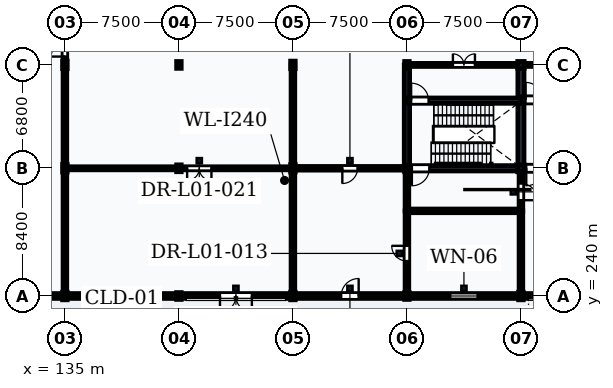
"""IFC4 building model, lengths in metres.
Left out: names, types, materials, properties, quantities, classifications, styles, units other than length and angle.
Written with IfcOpenShell. Run it as: python <this file> out.ifc"""

import sys

from ifc_helpers import new_model, si_unit, direction, frame, frame_2d, origin, origin_2d, place, context, subcontext, project, spatial, rectangle, i_section, extrude, element, fill, save


model = new_model("IFC4")
c1 = context("Model", 3, precision=1e-05, world=origin(), true_north=direction((0.0, 1.0)))
c2 = subcontext(c1, "Body", "Model", "MODEL_VIEW")
j1 = project(units=[si_unit("LENGTHUNIT", "METRE"), si_unit("PLANEANGLEUNIT", "RADIAN")], contexts=[c1])
p1 = place(None, origin())
s1 = spatial("IfcSite", under=j1, at=p1, CompositionType="ELEMENT")
p2 = place(p1, origin())
s2 = spatial("IfcBuilding", under=s1, at=p2, CompositionType="ELEMENT")
p3 = place(p2, origin())
s3 = spatial("IfcBuildingStorey", under=s2, at=p3, CompositionType="ELEMENT", Elevation=0.0)
for number, where, z_axis, x_axis in (
    (1, (135.0, 240.0, 0.0), (0.0, 0.0, 1.0), (1.0, 0.0, 0.0)),
    (2, (135.0, 248.4, 0.0), (0.0, 0.0, 1.0), (1.0, 0.0, 0.0)),
    (3, (135.0, 255.2, 0.0), (0.0, 0.0, 1.0), (1.0, 0.0, 0.0)),
):
    element("IfcColumn", number, at=place(p3, frame(where, z_axis=z_axis, x_axis=x_axis)), inside=s3, PredefinedType="COLUMN", context=c2, shape_type="SweptSolid", body=[
        extrude(i_section(OverallWidth=0.3, OverallDepth=0.5, WebThickness=0.014, FlangeThickness=0.028, FilletRadius=0.027, at=origin_2d()), origin(), (0.0, 0.0, 1.0), 5.4),
    ])
for number, where, z_axis, x_axis in (
    (4, (142.5, 240.0, 0.0), (0.0, 0.0, 1.0), (1.0, 0.0, 0.0)),
    (5, (142.5, 248.4, 0.0), (0.0, 0.0, 1.0), (1.0, 0.0, 0.0)),
    (6, (142.5, 255.2, 0.0), (0.0, 0.0, 1.0), (1.0, 0.0, 0.0)),
):
    element("IfcColumn", number, at=place(p3, frame(where, z_axis=z_axis, x_axis=x_axis)), inside=s3, PredefinedType="COLUMN", context=c2, shape_type="SweptSolid", body=[
        extrude(i_section(OverallWidth=0.3, OverallDepth=0.45, WebThickness=0.014, FlangeThickness=0.026, FilletRadius=0.027, at=origin_2d()), origin(), (0.0, 0.0, 1.0), 5.4),
    ])
for number, where, z_axis, x_axis in (
    (7, (150.0, 240.0, 0.0), (0.0, 0.0, 1.0), (1.0, 0.0, 0.0)),
    (8, (150.0, 248.4, 0.0), (0.0, 0.0, 1.0), (1.0, 0.0, 0.0)),
    (9, (150.0, 255.2, 0.0), (0.0, 0.0, 1.0), (1.0, 0.0, 0.0)),
):
    element("IfcColumn", number, at=place(p3, frame(where, z_axis=z_axis, x_axis=x_axis)), inside=s3, PredefinedType="COLUMN", context=c2, shape_type="SweptSolid", body=[
        extrude(i_section(OverallWidth=0.3, OverallDepth=0.5, WebThickness=0.014, FlangeThickness=0.028, FilletRadius=0.027, at=origin_2d()), origin(), (0.0, 0.0, 1.0), 5.4),
    ])
for number, where, z_axis, x_axis in (
    (10, (157.5, 240.0, 0.0), (0.0, 0.0, 1.0), (1.0, 0.0, 0.0)),
    (11, (157.5, 248.4, 0.0), (0.0, 0.0, 1.0), (1.0, 0.0, 0.0)),
    (12, (157.5, 255.2, 0.0), (0.0, 0.0, 1.0), (1.0, 0.0, 0.0)),
):
    element("IfcColumn", number, at=place(p3, frame(where, z_axis=z_axis, x_axis=x_axis)), inside=s3, PredefinedType="COLUMN", context=c2, shape_type="SweptSolid", body=[
        extrude(i_section(OverallWidth=0.3, OverallDepth=0.45, WebThickness=0.014, FlangeThickness=0.026, FilletRadius=0.027, at=origin_2d()), origin(), (0.0, 0.0, 1.0), 5.4),
    ])
p4 = place(p3, frame((165.0, 240.0, 0.0), z_axis=(0.0, 0.0, 1.0), x_axis=(1.0, 0.0, 0.0)))
e13 = element("IfcColumn", 13, at=p4, inside=s3, PredefinedType="COLUMN", context=c2, shape_type="SweptSolid", body=[
    extrude(i_section(OverallWidth=0.3, OverallDepth=0.5, WebThickness=0.014, FlangeThickness=0.028, FilletRadius=0.027, at=origin_2d()), origin(), (0.0, 0.0, 1.0), 5.4),
])
for number, where, z_axis, x_axis in (
    (14, (165.0, 248.4, 0.0), (0.0, 0.0, 1.0), (1.0, 0.0, 0.0)),
    (15, (165.0, 255.2, 0.0), (0.0, 0.0, 1.0), (1.0, 0.0, 0.0)),
):
    element("IfcColumn", number, at=place(p3, frame(where, z_axis=z_axis, x_axis=x_axis)), inside=s3, PredefinedType="COLUMN", context=c2, shape_type="SweptSolid", body=[
        extrude(i_section(OverallWidth=0.418, OverallDepth=0.455, WebThickness=0.042, FlangeThickness=0.068, FilletRadius=0.015, at=origin_2d()), origin(), (0.0, 0.0, 1.0), 5.4),
    ])
p5 = place(p3, frame((127.506, 240.0, 0.0), z_axis=(0.0, 0.0, 1.0), x_axis=(1.0, 0.0, 0.0)))
e16 = element("IfcWall", 16, at=p5, inside=s3, PredefinedType="SOLIDWALL", context=c2, shape_type="SweptSolid", body=[
    extrude(rectangle(XDim=7.488, YDim=0.32, at=frame_2d((3.744, 0.0))), origin(), (0.0, 0.0, 1.0), 4.878),
])
p6 = place(p5, frame((2.144, 0.0, 0.0)))
e17 = element("IfcOpeningElement", 17, at=p6, cuts=e16, PredefinedType="OPENING", context=c2, shape_type="SweptSolid", body=[
    extrude(rectangle(XDim=3.2, YDim=3.0, at=frame_2d((1.6, 1.5))), frame((0.0, 0.175, 0.0), z_axis=(0.0, -1.0, 0.0), x_axis=(1.0, 0.0, 0.0)), (0.0, 0.0, 1.0), 0.35),
])
p7 = place(p3, frame((135.006, 240.0, 0.0), z_axis=(0.0, 0.0, 1.0), x_axis=(1.0, 0.0, 0.0)))
e18 = element("IfcWall", 18, at=p7, inside=s3, PredefinedType="SOLIDWALL", context=c2, shape_type="SweptSolid", body=[
    extrude(rectangle(XDim=7.488, YDim=0.32, at=frame_2d((3.744, 0.0))), origin(), (0.0, 0.0, 1.0), 4.878),
])
p8 = place(p7, frame((2.544, 0.0, 0.95)))
e19 = element("IfcOpeningElement", 19, at=p8, cuts=e18, PredefinedType="OPENING", context=c2, shape_type="SweptSolid", body=[
    extrude(rectangle(XDim=2.4, YDim=2.8, at=frame_2d((1.2, 1.4))), frame((0.0, 0.175, 0.0), z_axis=(0.0, -1.0, 0.0), x_axis=(1.0, 0.0, 0.0)), (0.0, 0.0, 1.0), 0.35),
])
p9 = place(p3, frame((142.506, 240.0, 0.0), z_axis=(0.0, 0.0, 1.0), x_axis=(1.0, 0.0, 0.0)))
e20 = element("IfcWall", 20, at=p9, inside=s3, PredefinedType="SOLIDWALL", context=c2, shape_type="SweptSolid", body=[
    extrude(rectangle(XDim=7.488, YDim=0.32, at=frame_2d((3.744, 0.0))), origin(), (0.0, 0.0, 1.0), 4.878),
])
p10 = place(p9, frame((2.694, 0.0, 0.0)))
e21 = element("IfcOpeningElement", 21, at=p10, cuts=e20, PredefinedType="OPENING", context=c2, shape_type="SweptSolid", body=[
    extrude(rectangle(XDim=2.1, YDim=2.7, at=frame_2d((1.05, 1.35))), frame((0.0, 0.175, 0.0), z_axis=(0.0, -1.0, 0.0), x_axis=(1.0, 0.0, 0.0)), (0.0, 0.0, 1.0), 0.35),
])
p11 = place(p3, frame((150.006, 240.0, 0.0), z_axis=(0.0, 0.0, 1.0), x_axis=(1.0, 0.0, 0.0)))
e22 = element("IfcWall", 22, at=p11, inside=s3, PredefinedType="SOLIDWALL", context=c2, shape_type="SweptSolid", body=[
    extrude(rectangle(XDim=7.488, YDim=0.32, at=frame_2d((3.744, 0.0))), origin(), (0.0, 0.0, 1.0), 4.878),
])
p12 = place(p11, frame((3.169, 0.0, 0.0)))
e23 = element("IfcOpeningElement", 23, at=p12, cuts=e22, PredefinedType="OPENING", context=c2, shape_type="SweptSolid", body=[
    extrude(rectangle(XDim=1.15, YDim=2.25, at=frame_2d((0.575, 1.125))), frame((0.0, 0.175, 0.0), z_axis=(0.0, -1.0, 0.0), x_axis=(1.0, 0.0, 0.0)), (0.0, 0.0, 1.0), 0.35),
])
p13 = place(p3, frame((157.506, 240.0, 0.0), z_axis=(0.0, 0.0, 1.0), x_axis=(1.0, 0.0, 0.0)))
e24 = element("IfcWall", 24, at=p13, inside=s3, PredefinedType="SOLIDWALL", context=c2, shape_type="SweptSolid", body=[
    extrude(rectangle(XDim=7.488, YDim=0.32, at=frame_2d((3.744, 0.0))), origin(), (0.0, 0.0, 1.0), 4.878),
])
p14 = place(p13, frame((2.844, 0.0, 0.95)))
e25 = element("IfcOpeningElement", 25, at=p14, cuts=e24, PredefinedType="OPENING", context=c2, shape_type="SweptSolid", body=[
    extrude(rectangle(XDim=1.8, YDim=2.6, at=frame_2d((0.9, 1.3))), frame((0.0, 0.175, 0.0), z_axis=(0.0, -1.0, 0.0), x_axis=(1.0, 0.0, 0.0)), (0.0, 0.0, 1.0), 0.35),
])
p15 = place(p3, frame((165.006, 240.0, 0.0), z_axis=(0.0, 0.0, 1.0), x_axis=(1.0, 0.0, 0.0)))
e26 = element("IfcWall", 26, at=p15, inside=s3, PredefinedType="SOLIDWALL", context=c2, shape_type="SweptSolid", body=[
    extrude(rectangle(XDim=7.988, YDim=0.32, at=frame_2d((3.994, 0.0))), origin(), (0.0, 0.0, 1.0), 4.838),
])
p16 = place(p15, frame((2.944, 0.0, 0.0)))
e27 = element("IfcOpeningElement", 27, at=p16, cuts=e26, PredefinedType="OPENING", context=c2, shape_type="SweptSolid", body=[
    extrude(rectangle(XDim=2.1, YDim=2.7, at=frame_2d((1.05, 1.35))), frame((0.0, 0.175, 0.0), z_axis=(0.0, -1.0, 0.0), x_axis=(1.0, 0.0, 0.0)), (0.0, 0.0, 1.0), 0.35),
])
p17 = place(p3, frame((120.1, 240.1, 5.4), z_axis=(0.0, 0.0, 1.0), x_axis=(1.0, 0.0, 0.0)))
e28 = element("IfcWall", 28, at=p17, inside=s3, PredefinedType="PARAPET", context=c2, shape_type="SweptSolid", body=[
    extrude(rectangle(XDim=167.8, YDim=0.18, at=frame_2d((83.9, 0.0))), origin(), (0.0, 0.0, 1.0), 1.2),
])
p18 = place(p3, frame((165.0, 248.4, 0.0), z_axis=(0.0, 0.0, 1.0), x_axis=(1.0, 0.0, 0.0)))
e29 = element("IfcWall", 29, at=p18, inside=s3, PredefinedType="SHEAR", context=c2, shape_type="SweptSolid", body=[
    extrude(rectangle(XDim=8.0, YDim=0.4, at=frame_2d((4.0, 0.0))), origin(), (0.0, 0.0, 1.0), 5.14),
])
p19 = place(p18, frame((0.35, 0.0, 0.0)))
e30 = element("IfcOpeningElement", 30, at=p19, cuts=e29, PredefinedType="OPENING", context=c2, shape_type="SweptSolid", body=[
    extrude(rectangle(XDim=1.15, YDim=2.15, at=frame_2d((0.575, 1.075))), frame((0.0, 0.215, 0.0), z_axis=(0.0, -1.0, 0.0), x_axis=(1.0, 0.0, 0.0)), (0.0, 0.0, 1.0), 0.43),
])
p20 = place(p3, frame((165.0, 248.4, 0.0), z_axis=(0.0, 0.0, 1.0), x_axis=(0.0, 1.0, 0.0)))
e31 = element("IfcWall", 31, at=p20, inside=s3, PredefinedType="SHEAR", context=c2, shape_type="SweptSolid", body=[
    extrude(rectangle(XDim=6.8, YDim=0.4, at=frame_2d((3.4, 0.0))), origin(), (0.0, 0.0, 1.0), 5.14),
])
p21 = place(p3, frame((165.0, 252.9, 0.0), z_axis=(0.0, 0.0, 1.0), x_axis=(1.0, 0.0, 0.0)))
e32 = element("IfcWall", 32, at=p21, inside=s3, PredefinedType="SHEAR", context=c2, shape_type="SweptSolid", body=[
    extrude(rectangle(XDim=8.0, YDim=0.4, at=frame_2d((4.0, 0.0))), origin(), (0.0, 0.0, 1.0), 5.14),
])
p22 = place(p21, frame((0.3, 0.0, 0.0)))
e33 = element("IfcOpeningElement", 33, at=p22, cuts=e32, PredefinedType="OPENING", context=c2, shape_type="SweptSolid", body=[
    extrude(rectangle(XDim=1.15, YDim=2.15, at=frame_2d((0.575, 1.075))), frame((0.0, 0.215, 0.0), z_axis=(0.0, -1.0, 0.0), x_axis=(1.0, 0.0, 0.0)), (0.0, 0.0, 1.0), 0.43),
])
p23 = place(p3, frame((165.0, 255.2, 0.0), z_axis=(0.0, 0.0, 1.0), x_axis=(1.0, 0.0, 0.0)))
e34 = element("IfcWall", 34, at=p23, inside=s3, PredefinedType="PARTITIONING", context=c2, shape_type="SweptSolid", body=[
    extrude(rectangle(XDim=8.0, YDim=0.2, at=frame_2d((4.0, 0.0))), origin(), (0.0, 0.0, 1.0), 4.638),
])
p24 = place(p23, frame((3.275, 0.0, 0.0)))
e35 = element("IfcOpeningElement", 35, at=p24, cuts=e34, PredefinedType="OPENING", context=c2, shape_type="SweptSolid", body=[
    extrude(rectangle(XDim=1.45, YDim=2.2, at=frame_2d((0.725, 1.1))), frame((0.0, 0.115, 0.0), z_axis=(0.0, -1.0, 0.0), x_axis=(1.0, 0.0, 0.0)), (0.0, 0.0, 1.0), 0.23),
])
p25 = place(p3, frame((157.5, 248.4, 0.0), z_axis=(0.0, 0.0, 1.0), x_axis=(1.0, 0.0, 0.0)))
e36 = element("IfcWall", 36, at=p25, inside=s3, PredefinedType="SHEAR", context=c2, shape_type="SweptSolid", body=[
    extrude(rectangle(XDim=7.5, YDim=0.35, at=frame_2d((3.75, 0.0))), origin(), (0.0, 0.0, 1.0), 5.14),
])
p26 = place(p25, frame((0.325, 0.0, 0.0)))
e37 = element("IfcOpeningElement", 37, at=p26, cuts=e36, PredefinedType="OPENING", context=c2, shape_type="SweptSolid", body=[
    extrude(rectangle(XDim=1.15, YDim=2.15, at=frame_2d((0.575, 1.075))), frame((0.0, 0.19, 0.0), z_axis=(0.0, -1.0, 0.0), x_axis=(1.0, 0.0, 0.0)), (0.0, 0.0, 1.0), 0.38),
])
p27 = place(p3, frame((157.5, 248.4, 0.0), z_axis=(0.0, 0.0, 1.0), x_axis=(0.0, 1.0, 0.0)))
e38 = element("IfcWall", 38, at=p27, inside=s3, PredefinedType="SHEAR", context=c2, shape_type="SweptSolid", body=[
    extrude(rectangle(XDim=6.8, YDim=0.35, at=frame_2d((3.4, 0.0))), origin(), (0.0, 0.0, 1.0), 5.14),
])
p28 = place(p3, frame((157.5, 252.85, 0.0), z_axis=(0.0, 0.0, 1.0), x_axis=(1.0, 0.0, 0.0)))
e39 = element("IfcWall", 39, at=p28, inside=s3, PredefinedType="SHEAR", context=c2, shape_type="SweptSolid", body=[
    extrude(rectangle(XDim=7.5, YDim=0.35, at=frame_2d((3.75, 0.0))), origin(), (0.0, 0.0, 1.0), 5.14),
])
p29 = place(p28, frame((0.275, 0.0, 0.0)))
e40 = element("IfcOpeningElement", 40, at=p29, cuts=e39, PredefinedType="OPENING", context=c2, shape_type="SweptSolid", body=[
    extrude(rectangle(XDim=1.15, YDim=2.15, at=frame_2d((0.575, 1.075))), frame((0.0, 0.19, 0.0), z_axis=(0.0, -1.0, 0.0), x_axis=(1.0, 0.0, 0.0)), (0.0, 0.0, 1.0), 0.38),
])
p30 = place(p3, frame((157.5, 255.2, 0.0), z_axis=(0.0, 0.0, 1.0), x_axis=(1.0, 0.0, 0.0)))
e41 = element("IfcWall", 41, at=p30, inside=s3, PredefinedType="PARTITIONING", context=c2, shape_type="SweptSolid", body=[
    extrude(rectangle(XDim=7.5, YDim=0.2, at=frame_2d((3.75, 0.0))), origin(), (0.0, 0.0, 1.0), 4.778),
])
p31 = place(p30, frame((3.025, 0.0, 0.0)))
e42 = element("IfcOpeningElement", 42, at=p31, cuts=e41, PredefinedType="OPENING", context=c2, shape_type="SweptSolid", body=[
    extrude(rectangle(XDim=1.45, YDim=2.2, at=frame_2d((0.725, 1.1))), frame((0.0, 0.115, 0.0), z_axis=(0.0, -1.0, 0.0), x_axis=(1.0, 0.0, 0.0)), (0.0, 0.0, 1.0), 0.23),
])
p32 = place(p3, frame((150.0, 240.0, 0.0), z_axis=(0.0, 0.0, 1.0), x_axis=(0.0, 1.0, 0.0)))
e43 = element("IfcWall", 43, at=p32, inside=s3, PredefinedType="PARTITIONING", context=c2, shape_type="SweptSolid", body=[
    extrude(rectangle(XDim=15.2, YDim=0.24, at=frame_2d((7.6, 0.0))), origin(), (0.0, 0.0, 1.0), 4.688),
])
p33 = place(p3, frame((157.5, 240.0, 0.0), z_axis=(0.0, 0.0, 1.0), x_axis=(0.0, 1.0, 0.0)))
e44 = element("IfcWall", 44, at=p33, inside=s3, PredefinedType="PARTITIONING", context=c2, shape_type="SweptSolid", body=[
    extrude(rectangle(XDim=5.6, YDim=0.24, at=frame_2d((2.8, 0.0))), origin(), (0.0, 0.0, 1.0), 4.688),
])
p34 = place(p33, frame((2.3, 0.0, 0.0)))
e45 = element("IfcOpeningElement", 45, at=p34, cuts=e44, PredefinedType="OPENING", context=c2, shape_type="SweptSolid", body=[
    extrude(rectangle(XDim=1.0, YDim=2.1, at=frame_2d((0.5, 1.05))), frame((0.0, 0.135, 0.0), z_axis=(0.0, -1.0, 0.0), x_axis=(1.0, 0.0, 0.0)), (0.0, 0.0, 1.0), 0.27),
])
p35 = place(p3, frame((157.5, 245.6, 0.0), z_axis=(0.0, 0.0, 1.0), x_axis=(0.0, 1.0, 0.0)))
e46 = element("IfcWall", 46, at=p35, inside=s3, PredefinedType="PARTITIONING", context=c2, shape_type="SweptSolid", body=[
    extrude(rectangle(XDim=2.8, YDim=0.24, at=frame_2d((1.4, 0.0))), origin(), (0.0, 0.0, 1.0), 4.688),
])
p36 = place(p3, frame((150.0, 248.4, 0.0), z_axis=(0.0, 0.0, 1.0), x_axis=(1.0, 0.0, 0.0)))
e47 = element("IfcWall", 47, at=p36, inside=s3, PredefinedType="PARTITIONING", context=c2, shape_type="SweptSolid", body=[
    extrude(rectangle(XDim=7.5, YDim=0.24, at=frame_2d((3.75, 0.0))), origin(), (0.0, 0.0, 1.0), 4.778),
])
p37 = place(p36, frame((3.25, 0.0, 0.0)))
e48 = element("IfcOpeningElement", 48, at=p37, cuts=e47, PredefinedType="OPENING", context=c2, shape_type="SweptSolid", body=[
    extrude(rectangle(XDim=1.0, YDim=2.1, at=frame_2d((0.5, 1.05))), frame((0.0, 0.135, 0.0), z_axis=(0.0, -1.0, 0.0), x_axis=(1.0, 0.0, 0.0)), (0.0, 0.0, 1.0), 0.27),
])
p38 = place(p3, frame((135.0, 240.0, 0.0), z_axis=(0.0, 0.0, 1.0), x_axis=(0.0, 1.0, 0.0)))
e49 = element("IfcWall", 49, at=p38, inside=s3, PredefinedType="PARTITIONING", context=c2, shape_type="SweptSolid", body=[
    extrude(rectangle(XDim=18.2, YDim=0.24, at=frame_2d((9.1, 0.0))), origin(), (0.0, 0.0, 1.0), 4.688),
])
p39 = place(p38, frame((15.75, 0.0, 0.0)))
e50 = element("IfcOpeningElement", 50, at=p39, cuts=e49, PredefinedType="OPENING", context=c2, shape_type="SweptSolid", body=[
    extrude(rectangle(XDim=1.8, YDim=2.25, at=frame_2d((0.9, 1.125))), frame((0.0, 0.135, 0.0), z_axis=(0.0, -1.0, 0.0), x_axis=(1.0, 0.0, 0.0)), (0.0, 0.0, 1.0), 0.27),
])
p40 = place(p3, frame((157.5, 245.6, 0.0), z_axis=(0.0, 0.0, 1.0), x_axis=(1.0, 0.0, 0.0)))
e51 = element("IfcWall", 51, at=p40, inside=s3, PredefinedType="PARTITIONING", context=c2, shape_type="SweptSolid", body=[
    extrude(rectangle(XDim=7.5, YDim=0.24, at=frame_2d((3.75, 0.0))), origin(), (0.0, 0.0, 1.0), 5.15),
])
p41 = place(p3, frame((165.0, 240.0, 0.0), z_axis=(0.0, 0.0, 1.0), x_axis=(0.0, 1.0, 0.0)))
e52 = element("IfcWall", 52, at=p41, inside=s3, PredefinedType="PARTITIONING", context=c2, shape_type="SweptSolid", body=[
    extrude(rectangle(XDim=5.6, YDim=0.24, at=frame_2d((2.8, 0.0))), origin(), (0.0, 0.0, 1.0), 4.688),
])
p42 = place(p3, frame((165.0, 245.6, 0.0), z_axis=(0.0, 0.0, 1.0), x_axis=(0.0, 1.0, 0.0)))
e53 = element("IfcWall", 53, at=p42, inside=s3, PredefinedType="PARTITIONING", context=c2, shape_type="SweptSolid", body=[
    extrude(rectangle(XDim=2.8, YDim=0.24, at=frame_2d((1.4, 0.0))), origin(), (0.0, 0.0, 1.0), 4.688),
])
p43 = place(p42, frame((0.7, 0.0, 0.0)))
e54 = element("IfcOpeningElement", 54, at=p43, cuts=e53, PredefinedType="OPENING", context=c2, shape_type="SweptSolid", body=[
    extrude(rectangle(XDim=1.1, YDim=2.1, at=frame_2d((0.55, 1.05))), frame((0.0, 0.135, 0.0), z_axis=(0.0, -1.0, 0.0), x_axis=(1.0, 0.0, 0.0)), (0.0, 0.0, 1.0), 0.27),
])
p44 = place(p3, frame((135.0, 248.4, 0.0), z_axis=(0.0, 0.0, 1.0), x_axis=(1.0, 0.0, 0.0)))
e55 = element("IfcWall", 55, at=p44, inside=s3, PredefinedType="PARTITIONING", context=c2, shape_type="SweptSolid", body=[
    extrude(rectangle(XDim=15.0, YDim=0.2, at=frame_2d((7.5, 0.0))), origin(), (0.0, 0.0, 1.0), 4.778),
])
p45 = place(p44, frame((8.04, 0.0, 0.0)))
e56 = element("IfcOpeningElement", 56, at=p45, cuts=e55, PredefinedType="OPENING", context=c2, shape_type="SweptSolid", body=[
    extrude(rectangle(XDim=1.6, YDim=2.25, at=frame_2d((0.8, 1.125))), frame((0.0, 0.115, 0.0), z_axis=(0.0, -1.0, 0.0), x_axis=(1.0, 0.0, 0.0)), (0.0, 0.0, 1.0), 0.23),
])
p46 = place(p8, origin())
e57 = element("IfcWindow", 57, at=p46, inside=s3, PartitioningType="DOUBLE_PANEL_VERTICAL", PredefinedType="WINDOW", context=c2, shape_type="SweptSolid", body=[
    extrude(rectangle(XDim=2.4, YDim=2.8, at=frame_2d((1.2, 1.4))), frame((0.0, 0.03, 0.0), z_axis=(0.0, -1.0, 0.0), x_axis=(1.0, 0.0, 0.0)), (0.0, 0.0, 1.0), 0.06),
])
fill(e19, e57)
p47 = place(p10, frame((2.1, 0.0, 0.0), z_axis=(0.0, 0.0, 1.0), x_axis=(-1.0, 0.0, 0.0)))
e58 = element("IfcDoor", 58, at=p47, inside=s3, OperationType="DOUBLE_DOOR_SINGLE_SWING", PredefinedType="DOOR", context=c2, shape_type="SweptSolid", body=[
    extrude(rectangle(XDim=2.1, YDim=2.7, at=frame_2d((1.05, 1.35))), frame((0.0, 0.025, 0.0), z_axis=(0.0, -1.0, 0.0), x_axis=(1.0, 0.0, 0.0)), (0.0, 0.0, 1.0), 0.05),
])
fill(e21, e58)
p48 = place(p12, frame((1.15, 0.0, 0.0), z_axis=(0.0, 0.0, 1.0), x_axis=(-1.0, 0.0, 0.0)))
e59 = element("IfcDoor", 59, at=p48, inside=s3, OperationType="SINGLE_SWING_LEFT", PredefinedType="DOOR", context=c2, shape_type="SweptSolid", body=[
    extrude(rectangle(XDim=1.15, YDim=2.25, at=frame_2d((0.575, 1.125))), frame((0.0, 0.025, 0.0), z_axis=(0.0, -1.0, 0.0), x_axis=(1.0, 0.0, 0.0)), (0.0, 0.0, 1.0), 0.05),
])
fill(e23, e59)
p49 = place(p14, origin())
e60 = element("IfcWindow", 60, at=p49, inside=s3, PartitioningType="DOUBLE_PANEL_VERTICAL", PredefinedType="WINDOW", context=c2, shape_type="SweptSolid", body=[
    extrude(rectangle(XDim=1.8, YDim=2.6, at=frame_2d((0.9, 1.3))), frame((0.0, 0.03, 0.0), z_axis=(0.0, -1.0, 0.0), x_axis=(1.0, 0.0, 0.0)), (0.0, 0.0, 1.0), 0.06),
])
fill(e25, e60)
p50 = place(p22, origin())
e61 = element("IfcDoor", 61, at=p50, inside=s3, OperationType="SINGLE_SWING_LEFT", PredefinedType="DOOR", context=c2, shape_type="SweptSolid", body=[
    extrude(rectangle(XDim=1.15, YDim=2.15, at=frame_2d((0.575, 1.075))), frame((0.0, 0.025, 0.0), z_axis=(0.0, -1.0, 0.0), x_axis=(1.0, 0.0, 0.0)), (0.0, 0.0, 1.0), 0.05),
])
fill(e33, e61)
p51 = place(p19, frame((1.15, 0.0, 0.0), z_axis=(0.0, 0.0, 1.0), x_axis=(-1.0, 0.0, 0.0)))
e62 = element("IfcDoor", 62, at=p51, inside=s3, OperationType="SINGLE_SWING_RIGHT", PredefinedType="DOOR", context=c2, shape_type="SweptSolid", body=[
    extrude(rectangle(XDim=1.15, YDim=2.15, at=frame_2d((0.575, 1.075))), frame((0.0, 0.025, 0.0), z_axis=(0.0, -1.0, 0.0), x_axis=(1.0, 0.0, 0.0)), (0.0, 0.0, 1.0), 0.05),
])
fill(e30, e62)
p52 = place(p29, origin())
e63 = element("IfcDoor", 63, at=p52, inside=s3, OperationType="SINGLE_SWING_LEFT", PredefinedType="DOOR", context=c2, shape_type="SweptSolid", body=[
    extrude(rectangle(XDim=1.15, YDim=2.15, at=frame_2d((0.575, 1.075))), frame((0.0, 0.025, 0.0), z_axis=(0.0, -1.0, 0.0), x_axis=(1.0, 0.0, 0.0)), (0.0, 0.0, 1.0), 0.05),
])
fill(e40, e63)
p53 = place(p26, frame((1.15, 0.0, 0.0), z_axis=(0.0, 0.0, 1.0), x_axis=(-1.0, 0.0, 0.0)))
e64 = element("IfcDoor", 64, at=p53, inside=s3, OperationType="SINGLE_SWING_RIGHT", PredefinedType="DOOR", context=c2, shape_type="SweptSolid", body=[
    extrude(rectangle(XDim=1.15, YDim=2.15, at=frame_2d((0.575, 1.075))), frame((0.0, 0.025, 0.0), z_axis=(0.0, -1.0, 0.0), x_axis=(1.0, 0.0, 0.0)), (0.0, 0.0, 1.0), 0.05),
])
fill(e37, e64)
p54 = place(p31, origin())
e65 = element("IfcDoor", 65, at=p54, inside=s3, OperationType="DOUBLE_DOOR_SINGLE_SWING", PredefinedType="DOOR", context=c2, shape_type="SweptSolid", body=[
    extrude(rectangle(XDim=1.45, YDim=2.2, at=frame_2d((0.725, 1.1))), frame((0.0, 0.025, 0.0), z_axis=(0.0, -1.0, 0.0), x_axis=(1.0, 0.0, 0.0)), (0.0, 0.0, 1.0), 0.05),
])
fill(e42, e65)
p55 = place(p34, frame((1.0, 0.0, 0.0), z_axis=(0.0, 0.0, 1.0), x_axis=(-1.0, 0.0, 0.0)))
e66 = element("IfcDoor", 66, at=p55, inside=s3, OperationType="SINGLE_SWING_LEFT", PredefinedType="DOOR", context=c2, shape_type="SweptSolid", body=[
    extrude(rectangle(XDim=1.0, YDim=2.1, at=frame_2d((0.5, 1.05))), frame((0.0, 0.025, 0.0), z_axis=(0.0, -1.0, 0.0), x_axis=(1.0, 0.0, 0.0)), (0.0, 0.0, 1.0), 0.05),
])
fill(e45, e66)
p56 = place(p37, frame((1.0, 0.0, 0.0), z_axis=(0.0, 0.0, 1.0), x_axis=(-1.0, 0.0, 0.0)))
e67 = element("IfcDoor", 67, at=p56, inside=s3, OperationType="SINGLE_SWING_RIGHT", PredefinedType="DOOR", context=c2, shape_type="SweptSolid", body=[
    extrude(rectangle(XDim=1.0, YDim=2.1, at=frame_2d((0.5, 1.05))), frame((0.0, 0.025, 0.0), z_axis=(0.0, -1.0, 0.0), x_axis=(1.0, 0.0, 0.0)), (0.0, 0.0, 1.0), 0.05),
])
fill(e48, e67)
p57 = place(p39, origin())
e68 = element("IfcDoor", 68, at=p57, inside=s3, OperationType="DOUBLE_DOOR_SINGLE_SWING", PredefinedType="DOOR", context=c2, shape_type="SweptSolid", body=[
    extrude(rectangle(XDim=1.8, YDim=2.25, at=frame_2d((0.9, 1.125))), frame((0.0, 0.025, 0.0), z_axis=(0.0, -1.0, 0.0), x_axis=(1.0, 0.0, 0.0)), (0.0, 0.0, 1.0), 0.05),
])
fill(e50, e68)
p58 = place(p43, frame((1.1, 0.0, 0.0), z_axis=(0.0, 0.0, 1.0), x_axis=(-1.0, 0.0, 0.0)))
e69 = element("IfcDoor", 69, at=p58, inside=s3, OperationType="SINGLE_SWING_RIGHT", PredefinedType="DOOR", context=c2, shape_type="SweptSolid", body=[
    extrude(rectangle(XDim=1.1, YDim=2.1, at=frame_2d((0.55, 1.05))), frame((0.0, 0.025, 0.0), z_axis=(0.0, -1.0, 0.0), x_axis=(1.0, 0.0, 0.0)), (0.0, 0.0, 1.0), 0.05),
])
fill(e54, e69)
p59 = place(p45, frame((1.6, 0.0, 0.0), z_axis=(0.0, 0.0, 1.0), x_axis=(-1.0, 0.0, 0.0)))
e70 = element("IfcDoor", 70, at=p59, inside=s3, OperationType="DOUBLE_DOOR_SINGLE_SWING", PredefinedType="DOOR", context=c2, shape_type="SweptSolid", body=[
    extrude(rectangle(XDim=1.6, YDim=2.25, at=frame_2d((0.8, 1.125))), frame((0.0, 0.025, 0.0), z_axis=(0.0, -1.0, 0.0), x_axis=(1.0, 0.0, 0.0)), (0.0, 0.0, 1.0), 0.05),
])
fill(e56, e70)
save(model, sys.argv[1])
